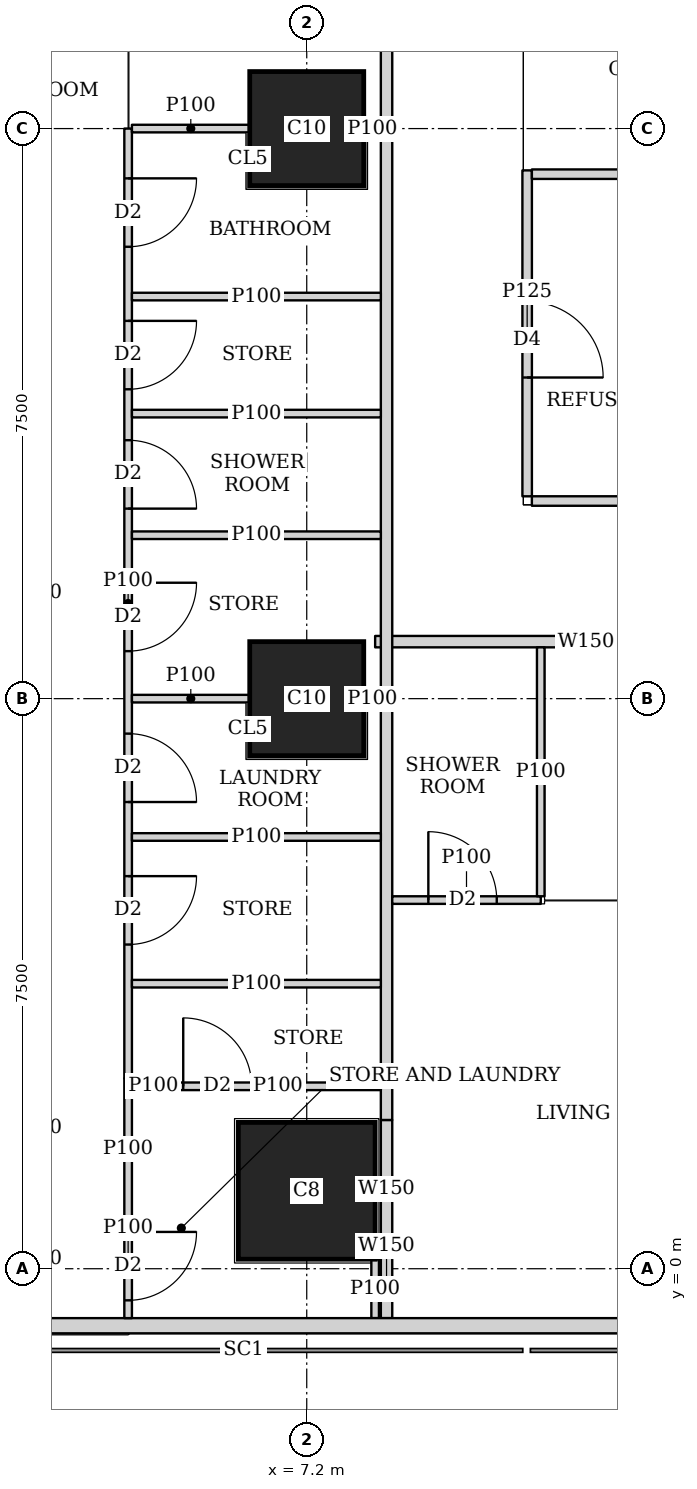
"""IFC4 building model, lengths in metres.
Left out: names, types, materials, properties, quantities, classifications, styles, units other than length and angle.
Written with IfcOpenShell. Run it as: python <this file> out.ifc"""

import sys

from ifc_helpers import new_model, si_unit, direction, frame, frame_2d, origin, origin_2d, place, context, subcontext, project, spatial, rectangle, extrude, element, fill, save


model = new_model("IFC4")
c1 = context("Model", 3, precision=1e-05, world=origin(), true_north=direction((0.0, 1.0)))
c2 = subcontext(c1, "Body", "Model", "MODEL_VIEW")
j1 = project(units=[si_unit("LENGTHUNIT", "METRE"), si_unit("PLANEANGLEUNIT", "RADIAN")], contexts=[c1])
p1 = place(None, origin())
s1 = spatial("IfcSite", under=j1, at=p1, CompositionType="ELEMENT")
p2 = place(p1, origin())
s2 = spatial("IfcBuilding", under=s1, at=p2, CompositionType="ELEMENT")
p3 = place(p2, frame((0.0, 0.0, 147.05)))
s3 = spatial("IfcBuildingStorey", under=s2, at=p3, CompositionType="ELEMENT", Elevation=147.05)
p4 = place(p3, frame((7.2, 1.025, 0.0), z_axis=(0.0, 0.0, 1.0), x_axis=(1.0, 0.0, 0.0)))
e1 = element("IfcColumn", 1, at=p4, inside=s3, PredefinedType="COLUMN", context=c2, shape_type="SweptSolid", body=[
    extrude(rectangle(XDim=1.8, YDim=1.8, at=origin_2d()), origin(), (0.0, 0.0, 1.0), 3.75),
])
for number, where, z_axis, x_axis in (
    (2, (7.2, 7.5, 0.0), (0.0, 0.0, 1.0), (1.0, 0.0, 0.0)),
    (3, (7.2, 15.0, 0.0), (0.0, 0.0, 1.0), (1.0, 0.0, 0.0)),
):
    element("IfcColumn", number, at=place(p3, frame(where, z_axis=z_axis, x_axis=x_axis)), inside=s3, PredefinedType="COLUMN", context=c2, shape_type="SweptSolid", body=[
        extrude(rectangle(XDim=1.5, YDim=1.5, at=origin_2d()), origin(), (0.0, 0.0, 1.0), 3.75),
    ])
p5 = place(p3, frame((2.163, -0.75, 0.0), z_axis=(0.0, 0.0, 1.0), x_axis=(1.0, 0.0, 0.0)))
e4 = element("IfcWall", 4, at=p5, inside=s3, PredefinedType="SOLIDWALL", context=c2, shape_type="SweptSolid", body=[
    extrude(rectangle(XDim=45.628, YDim=0.2, at=frame_2d((22.814, 0.0))), origin(), (0.0, 0.0, 1.0), 3.5),
])
p6 = place(p5, frame((9.537, 0.0, 0.9)))
e5 = element("IfcOpeningElement", 5, at=p6, cuts=e4, PredefinedType="OPENING", context=c2, shape_type="SweptSolid", body=[
    extrude(rectangle(XDim=1.8, YDim=1.5, at=frame_2d((0.9, 0.75))), frame((0.0, 0.11, 0.0), z_axis=(0.0, -1.0, 0.0), x_axis=(1.0, 0.0, 0.0)), (0.0, 0.0, 1.0), 0.22),
])
p7 = place(p5, frame((13.137, 0.0, 0.9)))
e6 = element("IfcOpeningElement", 6, at=p7, cuts=e4, PredefinedType="OPENING", context=c2, shape_type="SweptSolid", body=[
    extrude(rectangle(XDim=1.8, YDim=1.5, at=frame_2d((0.9, 0.75))), frame((0.0, 0.11, 0.0), z_axis=(0.0, -1.0, 0.0), x_axis=(1.0, 0.0, 0.0)), (0.0, 0.0, 1.0), 0.22),
])
p8 = place(p5, frame((16.737, 0.0, 0.9)))
e7 = element("IfcOpeningElement", 7, at=p8, cuts=e4, PredefinedType="OPENING", context=c2, shape_type="SweptSolid", body=[
    extrude(rectangle(XDim=1.8, YDim=1.5, at=frame_2d((0.9, 0.75))), frame((0.0, 0.11, 0.0), z_axis=(0.0, -1.0, 0.0), x_axis=(1.0, 0.0, 0.0)), (0.0, 0.0, 1.0), 0.22),
])
p9 = place(p5, frame((20.337, 0.0, 0.9)))
e8 = element("IfcOpeningElement", 8, at=p9, cuts=e4, PredefinedType="OPENING", context=c2, shape_type="SweptSolid", body=[
    extrude(rectangle(XDim=1.8, YDim=1.5, at=frame_2d((0.9, 0.75))), frame((0.0, 0.11, 0.0), z_axis=(0.0, -1.0, 0.0), x_axis=(1.0, 0.0, 0.0)), (0.0, 0.0, 1.0), 0.22),
])
p10 = place(p5, frame((23.937, 0.0, 0.9)))
e9 = element("IfcOpeningElement", 9, at=p10, cuts=e4, PredefinedType="OPENING", context=c2, shape_type="SweptSolid", body=[
    extrude(rectangle(XDim=1.8, YDim=1.5, at=frame_2d((0.9, 0.75))), frame((0.0, 0.11, 0.0), z_axis=(0.0, -1.0, 0.0), x_axis=(1.0, 0.0, 0.0)), (0.0, 0.0, 1.0), 0.22),
])
p11 = place(p5, frame((27.537, 0.0, 0.9)))
e10 = element("IfcOpeningElement", 10, at=p11, cuts=e4, PredefinedType="OPENING", context=c2, shape_type="SweptSolid", body=[
    extrude(rectangle(XDim=1.8, YDim=1.5, at=frame_2d((0.9, 0.75))), frame((0.0, 0.11, 0.0), z_axis=(0.0, -1.0, 0.0), x_axis=(1.0, 0.0, 0.0)), (0.0, 0.0, 1.0), 0.22),
])
p12 = place(p5, frame((31.137, 0.0, 0.9)))
e11 = element("IfcOpeningElement", 11, at=p12, cuts=e4, PredefinedType="OPENING", context=c2, shape_type="SweptSolid", body=[
    extrude(rectangle(XDim=1.8, YDim=1.5, at=frame_2d((0.9, 0.75))), frame((0.0, 0.11, 0.0), z_axis=(0.0, -1.0, 0.0), x_axis=(1.0, 0.0, 0.0)), (0.0, 0.0, 1.0), 0.22),
])
p13 = place(p5, frame((34.737, 0.0, 0.9)))
e12 = element("IfcOpeningElement", 12, at=p13, cuts=e4, PredefinedType="OPENING", context=c2, shape_type="SweptSolid", body=[
    extrude(rectangle(XDim=1.8, YDim=1.5, at=frame_2d((0.9, 0.75))), frame((0.0, 0.11, 0.0), z_axis=(0.0, -1.0, 0.0), x_axis=(1.0, 0.0, 0.0)), (0.0, 0.0, 1.0), 0.22),
])
p14 = place(p3, frame((8.25, -0.65, 0.0), z_axis=(0.0, 0.0, 1.0), x_axis=(0.0, 1.0, 0.0)))
e13 = element("IfcWall", 13, at=p14, inside=s3, PredefinedType="SOLIDWALL", context=c2, shape_type="SweptSolid", body=[
    extrude(rectangle(XDim=0.802, YDim=0.15, at=frame_2d((0.401, 0.0))), origin(), (0.0, 0.0, 1.0), 3.5),
])
p15 = place(p3, frame((8.25, 0.152, 0.0), z_axis=(0.0, 0.0, 1.0), x_axis=(0.0, 1.0, 0.0)))
e14 = element("IfcWall", 14, at=p15, inside=s3, PredefinedType="SOLIDWALL", context=c2, shape_type="SweptSolid", body=[
    extrude(rectangle(XDim=1.805, YDim=0.15, at=frame_2d((0.902, 0.0))), origin(), (0.0, 0.0, 1.0), 2.1),
])
p16 = place(p3, frame((8.25, 1.957, 0.0), z_axis=(0.0, 0.0, 1.0), x_axis=(0.0, 1.0, 0.0)))
e15 = element("IfcWall", 15, at=p16, inside=s3, PredefinedType="SOLIDWALL", context=c2, shape_type="SweptSolid", body=[
    extrude(rectangle(XDim=41.111, YDim=0.15, at=frame_2d((20.556, 0.0))), origin(), (0.0, 0.0, 1.0), 3.5),
])
p17 = place(p16, frame((14.418, 0.0, 0.0)))
e16 = element("IfcOpeningElement", 16, at=p17, cuts=e15, PredefinedType="OPENING", context=c2, shape_type="SweptSolid", body=[
    extrude(rectangle(XDim=1.0, YDim=2.1, at=frame_2d((0.5, 1.05))), frame((0.0, 0.085, 0.0), z_axis=(0.0, -1.0, 0.0), x_axis=(1.0, 0.0, 0.0)), (0.0, 0.0, 1.0), 0.17),
])
p18 = place(p16, frame((18.168, 0.0, 0.0)))
e17 = element("IfcOpeningElement", 17, at=p18, cuts=e15, PredefinedType="OPENING", context=c2, shape_type="SweptSolid", body=[
    extrude(rectangle(XDim=1.0, YDim=2.1, at=frame_2d((0.5, 1.05))), frame((0.0, 0.085, 0.0), z_axis=(0.0, -1.0, 0.0), x_axis=(1.0, 0.0, 0.0)), (0.0, 0.0, 1.0), 0.17),
])
p19 = place(p16, frame((33.168, 0.0, 0.0)))
e18 = element("IfcOpeningElement", 18, at=p19, cuts=e15, PredefinedType="OPENING", context=c2, shape_type="SweptSolid", body=[
    extrude(rectangle(XDim=1.0, YDim=2.1, at=frame_2d((0.5, 1.05))), frame((0.0, 0.085, 0.0), z_axis=(0.0, -1.0, 0.0), x_axis=(1.0, 0.0, 0.0)), (0.0, 0.0, 1.0), 0.17),
])
p20 = place(p3, frame((13.649, 8.25, 0.0), z_axis=(0.0, 0.0, 1.0), x_axis=(-1.0, 0.0, 0.0)))
e19 = element("IfcWall", 19, at=p20, inside=s3, PredefinedType="SOLIDWALL", context=c2, shape_type="SweptSolid", body=[
    extrude(rectangle(XDim=5.549, YDim=0.15, at=frame_2d((2.774, 0.0))), origin(), (0.0, 0.0, 1.0), 3.5),
])
p21 = place(p20, frame((0.81, 0.0, 0.0)))
e20 = element("IfcOpeningElement", 20, at=p21, cuts=e19, PredefinedType="OPENING", context=c2, shape_type="SweptSolid", body=[
    extrude(rectangle(XDim=1.0, YDim=2.1, at=frame_2d((0.5, 1.05))), frame((0.0, 0.085, 0.0), z_axis=(0.0, -1.0, 0.0), x_axis=(1.0, 0.0, 0.0)), (0.0, 0.0, 1.0), 0.17),
])
p22 = place(p3, frame((8.1, 0.124, 0.0), z_axis=(0.0, 0.0, 1.0), x_axis=(0.0, -1.0, 0.0)))
e21 = element("IfcWall", 21, at=p22, inside=s3, PredefinedType="PARTITIONING", context=c2, shape_type="SweptSolid", body=[
    extrude(rectangle(XDim=0.774, YDim=0.1, at=frame_2d((0.387, 0.0))), origin(), (0.0, 0.0, 1.0), 3.5),
])
p23 = place(p3, frame((4.85, -0.65, 0.0), z_axis=(0.0, 0.0, 1.0), x_axis=(0.0, 1.0, 0.0)))
e22 = element("IfcWall", 22, at=p23, inside=s3, PredefinedType="PARTITIONING", context=c2, shape_type="SweptSolid", body=[
    extrude(rectangle(XDim=1.284, YDim=0.1, at=frame_2d((0.642, 0.0))), origin(), (0.0, 0.0, 1.0), 3.5),
])
p24 = place(p23, frame((0.234, 0.0, 0.0)))
e23 = element("IfcOpeningElement", 23, at=p24, cuts=e22, PredefinedType="OPENING", context=c2, shape_type="SweptSolid", body=[
    extrude(rectangle(XDim=0.9, YDim=2.1, at=frame_2d((0.45, 1.05))), frame((0.0, 0.06, 0.0), z_axis=(0.0, -1.0, 0.0), x_axis=(1.0, 0.0, 0.0)), (0.0, 0.0, 1.0), 0.12),
])
p25 = place(p3, frame((4.85, 0.634, 0.0), z_axis=(0.0, 0.0, 1.0), x_axis=(0.0, 1.0, 0.0)))
e24 = element("IfcWall", 24, at=p25, inside=s3, PredefinedType="PARTITIONING", context=c2, shape_type="SweptSolid", body=[
    extrude(rectangle(XDim=1.871, YDim=0.1, at=frame_2d((0.936, 0.0))), origin(), (0.0, 0.0, 1.0), 2.1),
])
p26 = place(p3, frame((4.85, 2.505, 0.0), z_axis=(0.0, 0.0, 1.0), x_axis=(0.0, 1.0, 0.0)))
e25 = element("IfcWall", 25, at=p26, inside=s3, PredefinedType="PARTITIONING", context=c2, shape_type="SweptSolid", body=[
    extrude(rectangle(XDim=12.495, YDim=0.1, at=frame_2d((6.248, 0.0))), origin(), (0.0, 0.0, 1.0), 3.5),
])
p27 = place(p26, frame((10.94, 0.0, 0.0)))
e26 = element("IfcOpeningElement", 26, at=p27, cuts=e25, PredefinedType="OPENING", context=c2, shape_type="SweptSolid", body=[
    extrude(rectangle(XDim=0.9, YDim=2.1, at=frame_2d((0.45, 1.05))), frame((0.0, 0.06, 0.0), z_axis=(0.0, -1.0, 0.0), x_axis=(1.0, 0.0, 0.0)), (0.0, 0.0, 1.0), 0.12),
])
p28 = place(p26, frame((7.495, 0.0, 0.0)))
e27 = element("IfcOpeningElement", 27, at=p28, cuts=e25, PredefinedType="OPENING", context=c2, shape_type="SweptSolid", body=[
    extrude(rectangle(XDim=0.9, YDim=2.1, at=frame_2d((0.45, 1.05))), frame((0.0, 0.06, 0.0), z_axis=(0.0, -1.0, 0.0), x_axis=(1.0, 0.0, 0.0)), (0.0, 0.0, 1.0), 0.12),
])
p29 = place(p26, frame((3.635, 0.0, 0.0)))
e28 = element("IfcOpeningElement", 28, at=p29, cuts=e25, PredefinedType="OPENING", context=c2, shape_type="SweptSolid", body=[
    extrude(rectangle(XDim=0.9, YDim=2.1, at=frame_2d((0.45, 1.05))), frame((0.0, 0.06, 0.0), z_axis=(0.0, -1.0, 0.0), x_axis=(1.0, 0.0, 0.0)), (0.0, 0.0, 1.0), 0.12),
])
p30 = place(p26, frame((9.065, 0.0, 0.0)))
e29 = element("IfcOpeningElement", 29, at=p30, cuts=e25, PredefinedType="OPENING", context=c2, shape_type="SweptSolid", body=[
    extrude(rectangle(XDim=0.9, YDim=2.1, at=frame_2d((0.45, 1.05))), frame((0.0, 0.06, 0.0), z_axis=(0.0, -1.0, 0.0), x_axis=(1.0, 0.0, 0.0)), (0.0, 0.0, 1.0), 0.12),
])
p31 = place(p26, frame((5.62, 0.0, 0.0)))
e30 = element("IfcOpeningElement", 30, at=p31, cuts=e25, PredefinedType="OPENING", context=c2, shape_type="SweptSolid", body=[
    extrude(rectangle(XDim=0.9, YDim=2.1, at=frame_2d((0.45, 1.05))), frame((0.0, 0.06, 0.0), z_axis=(0.0, -1.0, 0.0), x_axis=(1.0, 0.0, 0.0)), (0.0, 0.0, 1.0), 0.12),
])
p32 = place(p26, frame((1.76, 0.0, 0.0)))
e31 = element("IfcOpeningElement", 31, at=p32, cuts=e25, PredefinedType="OPENING", context=c2, shape_type="SweptSolid", body=[
    extrude(rectangle(XDim=0.9, YDim=2.1, at=frame_2d((0.45, 1.05))), frame((0.0, 0.06, 0.0), z_axis=(0.0, -1.0, 0.0), x_axis=(1.0, 0.0, 0.0)), (0.0, 0.0, 1.0), 0.12),
])
p33 = place(p3, frame((4.9, 3.75, 0.0), z_axis=(0.0, 0.0, 1.0), x_axis=(1.0, 0.0, 0.0)))
e32 = element("IfcWall", 32, at=p33, inside=s3, PredefinedType="PARTITIONING", context=c2, shape_type="SweptSolid", body=[
    extrude(rectangle(XDim=3.275, YDim=0.1, at=frame_2d((1.638, 0.0))), origin(), (0.0, 0.0, 1.0), 3.5),
])
p34 = place(p3, frame((4.9, 7.5, 0.0), z_axis=(0.0, 0.0, 1.0), x_axis=(1.0, 0.0, 0.0)))
e33 = element("IfcWall", 33, at=p34, inside=s3, PredefinedType="PARTITIONING", context=c2, shape_type="SweptSolid", body=[
    extrude(rectangle(XDim=1.549, YDim=0.1, at=frame_2d((0.774, 0.0))), origin(), (0.0, 0.0, 1.0), 3.5),
])
p35 = place(p3, frame((7.951, 7.5, 0.0), z_axis=(0.0, 0.0, 1.0), x_axis=(1.0, 0.0, 0.0)))
e34 = element("IfcWall", 34, at=p35, inside=s3, PredefinedType="PARTITIONING", context=c2, shape_type="SweptSolid", body=[
    extrude(rectangle(XDim=0.224, YDim=0.1, at=frame_2d((0.112, 0.0))), origin(), (0.0, 0.0, 1.0), 3.5),
])
p36 = place(p3, frame((4.9, 11.25, 0.0), z_axis=(0.0, 0.0, 1.0), x_axis=(1.0, 0.0, 0.0)))
e35 = element("IfcWall", 35, at=p36, inside=s3, PredefinedType="PARTITIONING", context=c2, shape_type="SweptSolid", body=[
    extrude(rectangle(XDim=3.275, YDim=0.1, at=frame_2d((1.638, 0.0))), origin(), (0.0, 0.0, 1.0), 3.5),
])
p37 = place(p3, frame((4.9, 15.0, 0.0), z_axis=(0.0, 0.0, 1.0), x_axis=(1.0, 0.0, 0.0)))
e36 = element("IfcWall", 36, at=p37, inside=s3, PredefinedType="PARTITIONING", context=c2, shape_type="SweptSolid", body=[
    extrude(rectangle(XDim=1.549, YDim=0.1, at=frame_2d((0.774, 0.0))), origin(), (0.0, 0.0, 1.0), 3.5),
])
p38 = place(p3, frame((7.951, 15.0, 0.0), z_axis=(0.0, 0.0, 1.0), x_axis=(1.0, 0.0, 0.0)))
e37 = element("IfcWall", 37, at=p38, inside=s3, PredefinedType="PARTITIONING", context=c2, shape_type="SweptSolid", body=[
    extrude(rectangle(XDim=0.224, YDim=0.1, at=frame_2d((0.112, 0.0))), origin(), (0.0, 0.0, 1.0), 3.5),
])
for number, where, z_axis, x_axis in (
    (38, (4.9, 12.79, 0.0), (0.0, 0.0, 1.0), (1.0, 0.0, 0.0)),
    (39, (4.9, 9.65, 0.0), (0.0, 0.0, 1.0), (1.0, 0.0, 0.0)),
    (40, (4.9, 5.68, 0.0), (0.0, 0.0, 1.0), (1.0, 0.0, 0.0)),
):
    element("IfcWall", number, at=place(p3, frame(where, z_axis=z_axis, x_axis=x_axis)), inside=s3, PredefinedType="PARTITIONING", context=c2, shape_type="SweptSolid", body=[
        extrude(rectangle(XDim=3.275, YDim=0.1, at=frame_2d((1.638, 0.0))), origin(), (0.0, 0.0, 1.0), 3.5),
    ])
p39 = place(p3, frame((10.279, 4.85, 0.0), z_axis=(0.0, 0.0, 1.0), x_axis=(-1.0, 0.0, 0.0)))
e41 = element("IfcWall", 41, at=p39, inside=s3, PredefinedType="PARTITIONING", context=c2, shape_type="SweptSolid", body=[
    extrude(rectangle(XDim=1.954, YDim=0.1, at=frame_2d((0.977, 0.0))), origin(), (0.0, 0.0, 1.0), 3.5),
])
p40 = place(p39, frame((0.579, 0.0, 0.0)))
e42 = element("IfcOpeningElement", 42, at=p40, cuts=e41, PredefinedType="OPENING", context=c2, shape_type="SweptSolid", body=[
    extrude(rectangle(XDim=0.9, YDim=2.1, at=frame_2d((0.45, 1.05))), frame((0.0, 0.06, 0.0), z_axis=(0.0, -1.0, 0.0), x_axis=(1.0, 0.0, 0.0)), (0.0, 0.0, 1.0), 0.12),
])
p41 = place(p3, frame((10.279, 4.9, 0.0), z_axis=(0.0, 0.0, 1.0), x_axis=(0.0, 1.0, 0.0)))
e43 = element("IfcWall", 43, at=p41, inside=s3, PredefinedType="PARTITIONING", context=c2, shape_type="SweptSolid", body=[
    extrude(rectangle(XDim=3.275, YDim=0.1, at=frame_2d((1.638, 0.0))), origin(), (0.0, 0.0, 1.0), 3.5),
])
p42 = place(p3, frame((5.467, 2.4, 0.0), z_axis=(0.0, 0.0, 1.0), x_axis=(1.0, 0.0, 0.0)))
e44 = element("IfcWall", 44, at=p42, inside=s3, PredefinedType="PARTITIONING", context=c2, shape_type="SweptSolid", body=[
    extrude(rectangle(XDim=2.708, YDim=0.1, at=frame_2d((1.354, 0.0))), origin(), (0.0, 0.0, 1.0), 3.5),
])
p43 = place(p42, frame((0.108, 0.0, 0.0)))
e45 = element("IfcOpeningElement", 45, at=p43, cuts=e44, PredefinedType="OPENING", context=c2, shape_type="SweptSolid", body=[
    extrude(rectangle(XDim=0.9, YDim=2.1, at=frame_2d((0.45, 1.05))), frame((0.0, 0.06, 0.0), z_axis=(0.0, -1.0, 0.0), x_axis=(1.0, 0.0, 0.0)), (0.0, 0.0, 1.0), 0.12),
])
p44 = place(p3, frame((5.467, 2.4, 0.0), z_axis=(0.0, 0.0, 1.0), x_axis=(-1.0, 0.0, 0.0)))
e46 = element("IfcWall", 46, at=p44, inside=s3, PredefinedType="PARTITIONING", context=c2, shape_type="SweptSolid", body=[
    extrude(rectangle(XDim=0.567, YDim=0.1, at=frame_2d((0.284, 0.0))), origin(), (0.0, 0.0, 1.0), 2.1),
])
p45 = place(p3, frame((10.1, 10.162, 0.0), z_axis=(0.0, 0.0, 1.0), x_axis=(0.0, 1.0, 0.0)))
e47 = element("IfcWall", 47, at=p45, inside=s3, PredefinedType="PARTITIONING", context=c2, shape_type="SweptSolid", body=[
    extrude(rectangle(XDim=4.288, YDim=0.125, at=frame_2d((2.144, 0.0))), origin(), (0.0, 0.0, 1.0), 3.5),
])
p46 = place(p45, frame((1.563, 0.0, 0.0)))
e48 = element("IfcOpeningElement", 48, at=p46, cuts=e47, PredefinedType="OPENING", context=c2, shape_type="SweptSolid", body=[
    extrude(rectangle(XDim=1.0, YDim=2.1, at=frame_2d((0.5, 1.05))), frame((0.0, 0.073, 0.0), z_axis=(0.0, -1.0, 0.0), x_axis=(1.0, 0.0, 0.0)), (0.0, 0.0, 1.0), 0.145),
])
p47 = place(p3, frame((10.162, 14.4, 0.0), z_axis=(0.0, 0.0, 1.0), x_axis=(1.0, 0.0, 0.0)))
e49 = element("IfcWall", 49, at=p47, inside=s3, PredefinedType="PARTITIONING", context=c2, shape_type="SweptSolid", body=[
    extrude(rectangle(XDim=3.726, YDim=0.125, at=frame_2d((1.863, 0.0))), origin(), (0.0, 0.0, 1.0), 3.5),
])
p48 = place(p3, frame((10.162, 10.1, 0.0), z_axis=(0.0, 0.0, 1.0), x_axis=(1.0, 0.0, 0.0)))
e50 = element("IfcWall", 50, at=p48, inside=s3, PredefinedType="PARTITIONING", context=c2, shape_type="SweptSolid", body=[
    extrude(rectangle(XDim=11.288, YDim=0.125, at=frame_2d((5.644, 0.0))), origin(), (0.0, 0.0, 1.0), 3.5),
])
p49 = place(p48, frame((7.833, 0.0, 0.0)))
e51 = element("IfcOpeningElement", 51, at=p49, cuts=e50, PredefinedType="OPENING", context=c2, shape_type="SweptSolid", body=[
    extrude(rectangle(XDim=1.8, YDim=2.1, at=frame_2d((0.9, 1.05))), frame((0.0, 0.073, 0.0), z_axis=(0.0, -1.0, 0.0), x_axis=(1.0, 0.0, 0.0)), (0.0, 0.0, 1.0), 0.145),
])
p50 = place(p27, origin())
e52 = element("IfcDoor", 52, at=p50, inside=s3, OperationType="SINGLE_SWING_LEFT", PredefinedType="DOOR", context=c2, shape_type="SweptSolid", body=[
    extrude(rectangle(XDim=0.9, YDim=2.1, at=frame_2d((0.45, 1.05))), frame((0.0, 0.025, 0.0), z_axis=(0.0, -1.0, 0.0), x_axis=(1.0, 0.0, 0.0)), (0.0, 0.0, 1.0), 0.05),
])
fill(e26, e52)
p51 = place(p28, origin())
e53 = element("IfcDoor", 53, at=p51, inside=s3, OperationType="SINGLE_SWING_RIGHT", PredefinedType="DOOR", context=c2, shape_type="SweptSolid", body=[
    extrude(rectangle(XDim=0.9, YDim=2.1, at=frame_2d((0.45, 1.05))), frame((0.0, 0.025, 0.0), z_axis=(0.0, -1.0, 0.0), x_axis=(1.0, 0.0, 0.0)), (0.0, 0.0, 1.0), 0.05),
])
fill(e27, e53)
p52 = place(p29, origin())
e54 = element("IfcDoor", 54, at=p52, inside=s3, OperationType="SINGLE_SWING_RIGHT", PredefinedType="DOOR", context=c2, shape_type="SweptSolid", body=[
    extrude(rectangle(XDim=0.9, YDim=2.1, at=frame_2d((0.45, 1.05))), frame((0.0, 0.025, 0.0), z_axis=(0.0, -1.0, 0.0), x_axis=(1.0, 0.0, 0.0)), (0.0, 0.0, 1.0), 0.05),
])
fill(e28, e54)
p53 = place(p24, origin())
e55 = element("IfcDoor", 55, at=p53, inside=s3, OperationType="SINGLE_SWING_LEFT", PredefinedType="DOOR", context=c2, shape_type="SweptSolid", body=[
    extrude(rectangle(XDim=0.9, YDim=2.1, at=frame_2d((0.45, 1.05))), frame((0.0, 0.025, 0.0), z_axis=(0.0, -1.0, 0.0), x_axis=(1.0, 0.0, 0.0)), (0.0, 0.0, 1.0), 0.05),
])
fill(e23, e55)
p54 = place(p30, origin())
e56 = element("IfcDoor", 56, at=p54, inside=s3, OperationType="SINGLE_SWING_LEFT", PredefinedType="DOOR", context=c2, shape_type="SweptSolid", body=[
    extrude(rectangle(XDim=0.9, YDim=2.1, at=frame_2d((0.45, 1.05))), frame((0.0, 0.025, 0.0), z_axis=(0.0, -1.0, 0.0), x_axis=(1.0, 0.0, 0.0)), (0.0, 0.0, 1.0), 0.05),
])
fill(e29, e56)
p55 = place(p31, origin())
e57 = element("IfcDoor", 57, at=p55, inside=s3, OperationType="SINGLE_SWING_LEFT", PredefinedType="DOOR", context=c2, shape_type="SweptSolid", body=[
    extrude(rectangle(XDim=0.9, YDim=2.1, at=frame_2d((0.45, 1.05))), frame((0.0, 0.025, 0.0), z_axis=(0.0, -1.0, 0.0), x_axis=(1.0, 0.0, 0.0)), (0.0, 0.0, 1.0), 0.05),
])
fill(e30, e57)
p56 = place(p32, origin())
e58 = element("IfcDoor", 58, at=p56, inside=s3, OperationType="SINGLE_SWING_LEFT", PredefinedType="DOOR", context=c2, shape_type="SweptSolid", body=[
    extrude(rectangle(XDim=0.9, YDim=2.1, at=frame_2d((0.45, 1.05))), frame((0.0, 0.025, 0.0), z_axis=(0.0, -1.0, 0.0), x_axis=(1.0, 0.0, 0.0)), (0.0, 0.0, 1.0), 0.05),
])
fill(e31, e58)
p57 = place(p40, origin())
e59 = element("IfcDoor", 59, at=p57, inside=s3, OperationType="SINGLE_SWING_LEFT", PredefinedType="DOOR", context=c2, shape_type="SweptSolid", body=[
    extrude(rectangle(XDim=0.9, YDim=2.1, at=frame_2d((0.45, 1.05))), frame((0.0, 0.025, 0.0), z_axis=(0.0, -1.0, 0.0), x_axis=(1.0, 0.0, 0.0)), (0.0, 0.0, 1.0), 0.05),
])
fill(e42, e59)
p58 = place(p43, origin())
e60 = element("IfcDoor", 60, at=p58, inside=s3, OperationType="SINGLE_SWING_LEFT", PredefinedType="DOOR", context=c2, shape_type="SweptSolid", body=[
    extrude(rectangle(XDim=0.9, YDim=2.1, at=frame_2d((0.45, 1.05))), frame((0.0, 0.025, 0.0), z_axis=(0.0, -1.0, 0.0), x_axis=(1.0, 0.0, 0.0)), (0.0, 0.0, 1.0), 0.05),
])
fill(e45, e60)
p59 = place(p46, origin())
e61 = element("IfcDoor", 61, at=p59, inside=s3, OperationType="SINGLE_SWING_RIGHT", PredefinedType="DOOR", context=c2, shape_type="SweptSolid", body=[
    extrude(rectangle(XDim=1.0, YDim=2.1, at=frame_2d((0.5, 1.05))), frame((0.0, 0.025, 0.0), z_axis=(0.0, -1.0, 0.0), x_axis=(1.0, 0.0, 0.0)), (0.0, 0.0, 1.0), 0.05),
])
fill(e48, e61)
save(model, sys.argv[1])
